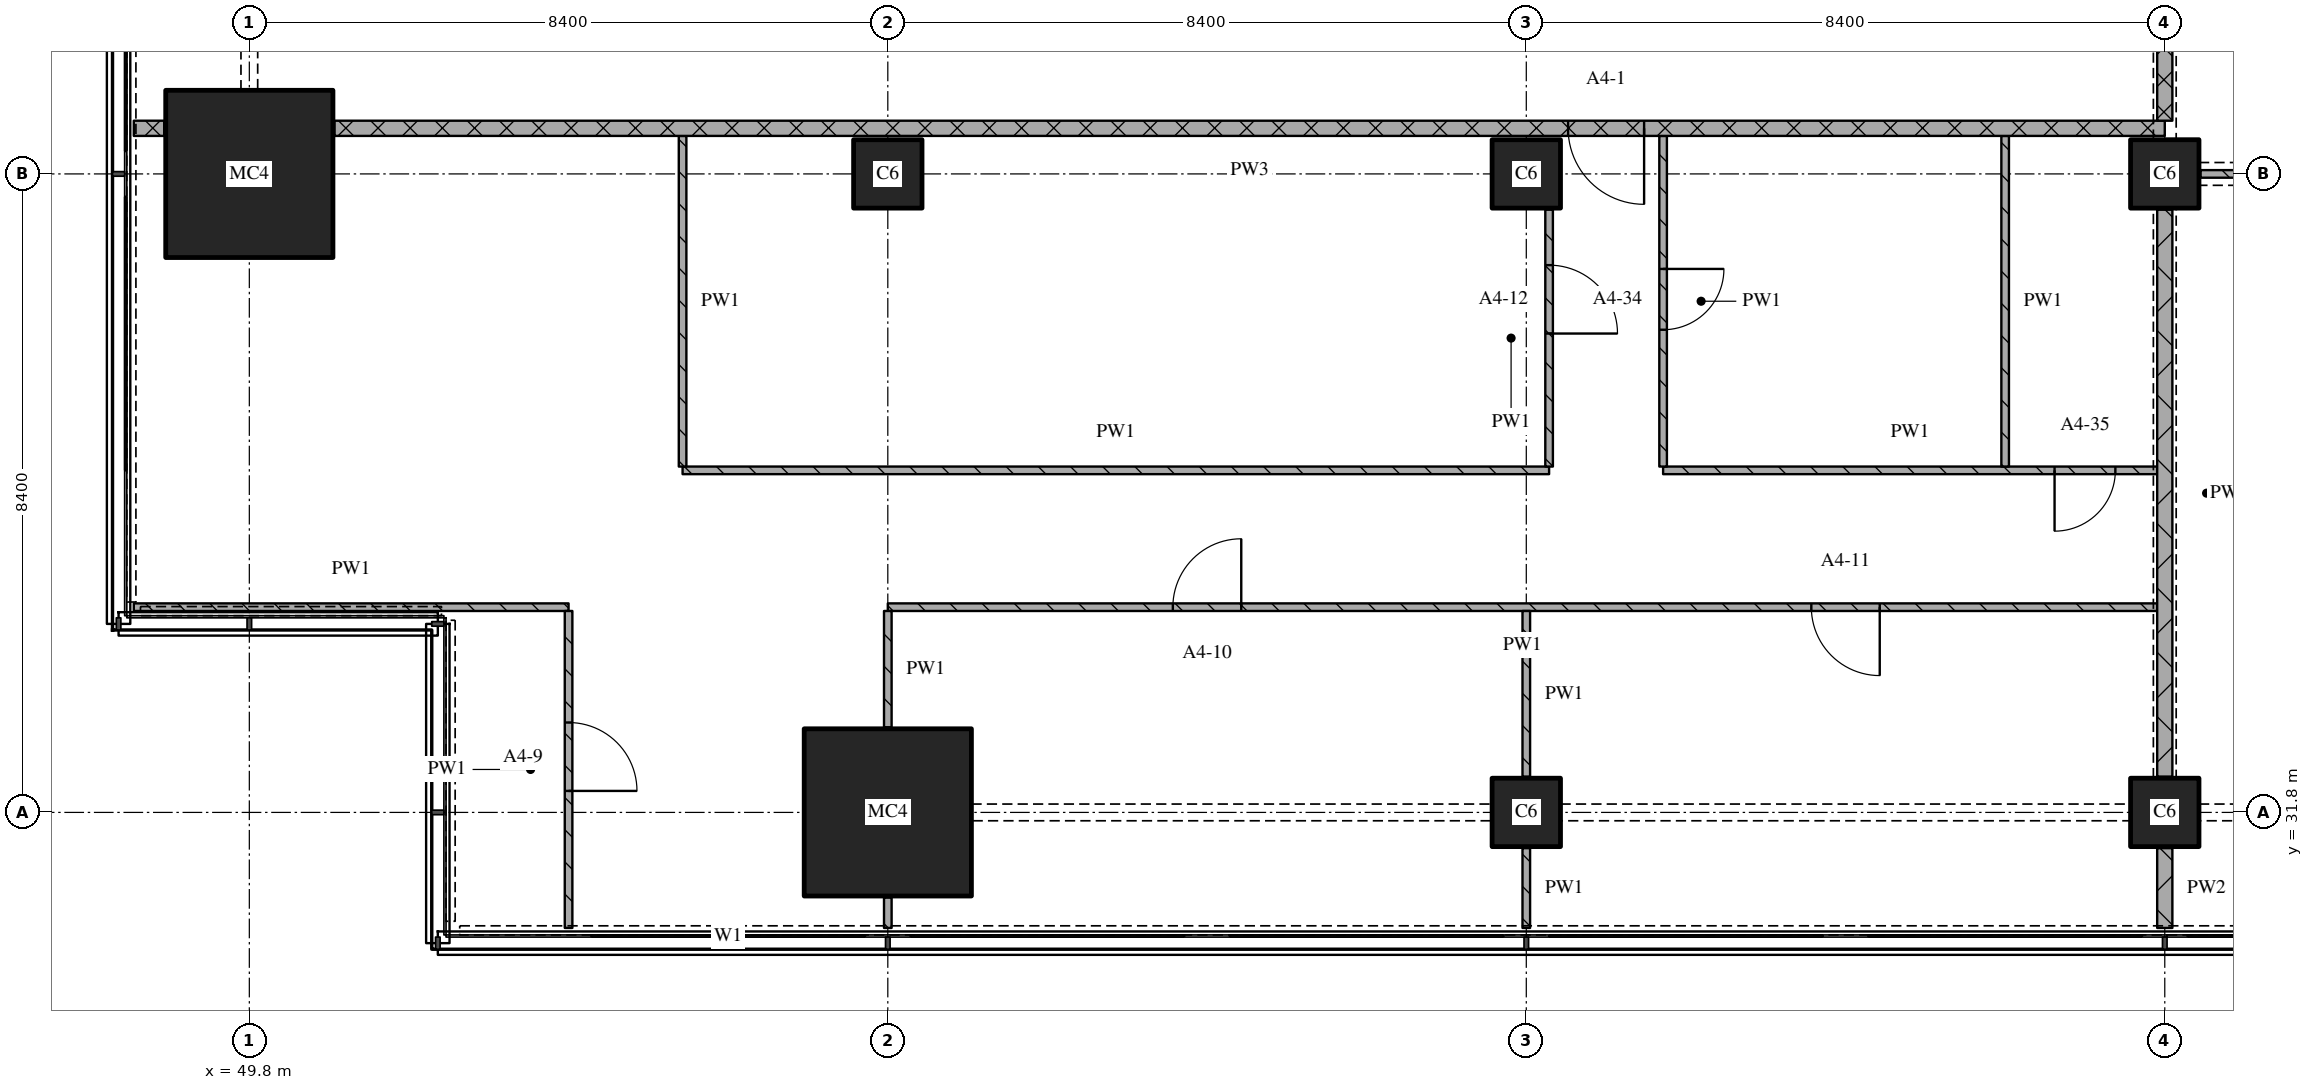
"""IFC4 building model, lengths in metres.
Left out: names, types, materials, properties, quantities, classifications, styles, units other than length and angle.
Written with IfcOpenShell. Run it as: python <this file> out.ifc"""

import sys

from ifc_helpers import new_model, si_unit, direction, frame, frame_2d, origin, origin_2d, place, context, subcontext, project, spatial, rectangle, extrude, element, fill, save


model = new_model("IFC4")
c1 = context("Model", 3, precision=1e-05, world=origin(), true_north=direction((0.0, 1.0)))
c2 = subcontext(c1, "Body", "Model", "MODEL_VIEW")
j1 = project(units=[si_unit("LENGTHUNIT", "METRE"), si_unit("PLANEANGLEUNIT", "RADIAN")], contexts=[c1])
p1 = place(None, origin())
s1 = spatial("IfcSite", under=j1, at=p1, CompositionType="ELEMENT")
p2 = place(p1, origin())
s2 = spatial("IfcBuilding", under=s1, at=p2, CompositionType="ELEMENT")
p3 = place(p2, frame((0.0, 0.0, 69.6)))
s3 = spatial("IfcBuildingStorey", under=s2, at=p3, CompositionType="ELEMENT", Elevation=69.6)
for number, where, z_axis, x_axis in (
    (1, (49.8, 40.2, 0.0), (0.0, 0.0, 1.0), (1.0, 0.0, 0.0)),
    (2, (58.2, 31.8, 0.0), (0.0, 0.0, 1.0), (1.0, 0.0, 0.0)),
):
    element("IfcColumn", number, at=place(p3, frame(where, z_axis=z_axis, x_axis=x_axis)), inside=s3, PredefinedType="COLUMN", context=c2, shape_type="SweptSolid", body=[
        extrude(rectangle(XDim=2.2, YDim=2.2, at=origin_2d()), origin(), (0.0, 0.0, 1.0), 3.6),
    ])
for number, where, z_axis, x_axis in (
    (3, (58.2, 40.2, 0.0), (0.0, 0.0, 1.0), (1.0, 0.0, 0.0)),
    (4, (66.6, 31.8, 0.0), (0.0, 0.0, 1.0), (1.0, 0.0, 0.0)),
    (5, (66.6, 40.2, 0.0), (0.0, 0.0, 1.0), (1.0, 0.0, 0.0)),
    (6, (75.0, 31.8, 0.0), (0.0, 0.0, 1.0), (1.0, 0.0, 0.0)),
    (7, (75.0, 40.2, 0.0), (0.0, 0.0, 1.0), (1.0, 0.0, 0.0)),
):
    element("IfcColumn", number, at=place(p3, frame(where, z_axis=z_axis, x_axis=x_axis)), inside=s3, PredefinedType="COLUMN", context=c2, shape_type="SweptSolid", body=[
        extrude(rectangle(XDim=0.9, YDim=0.9, at=origin_2d()), origin(), (0.0, 0.0, 1.0), 3.6),
    ])
p4 = place(p3, frame((48.28, 34.5, 0.0), z_axis=(0.0, 0.0, 1.0), x_axis=(1.0, 0.0, 0.0)))
e8 = element("IfcWall", 8, at=p4, inside=s3, PredefinedType="PARTITIONING", context=c2, shape_type="SweptSolid", body=[
    extrude(rectangle(XDim=5.72, YDim=0.1, at=frame_2d((2.86, 0.0))), origin(), (0.0, 0.0, 1.0), 3.32),
])
p5 = place(p3, frame((74.9, 34.5, 0.0), z_axis=(0.0, 0.0, 1.0), x_axis=(-1.0, 0.0, 0.0)))
e9 = element("IfcWall", 9, at=p5, inside=s3, PredefinedType="PARTITIONING", context=c2, shape_type="SweptSolid", body=[
    extrude(rectangle(XDim=16.7, YDim=0.1, at=frame_2d((8.35, 0.0))), origin(), (0.0, 0.0, 1.0), 3.32),
])
p6 = place(p5, frame((3.65, 0.0, 0.0)))
e10 = element("IfcOpeningElement", 10, at=p6, cuts=e9, PredefinedType="OPENING", context=c2, shape_type="SweptSolid", body=[
    extrude(rectangle(XDim=0.9, YDim=2.1, at=frame_2d((0.45, 1.05))), frame((0.0, 0.06, 0.0), z_axis=(0.0, -1.0, 0.0), x_axis=(1.0, 0.0, 0.0)), (0.0, 0.0, 1.0), 0.12),
])
p7 = place(p5, frame((12.05, 0.0, 0.0)))
e11 = element("IfcOpeningElement", 11, at=p7, cuts=e9, PredefinedType="OPENING", context=c2, shape_type="SweptSolid", body=[
    extrude(rectangle(XDim=0.9, YDim=2.1, at=frame_2d((0.45, 1.05))), frame((0.0, 0.06, 0.0), z_axis=(0.0, -1.0, 0.0), x_axis=(1.0, 0.0, 0.0)), (0.0, 0.0, 1.0), 0.12),
])
p8 = place(p3, frame((55.5, 36.3, 0.0), z_axis=(0.0, 0.0, 1.0), x_axis=(1.0, 0.0, 0.0)))
e12 = element("IfcWall", 12, at=p8, inside=s3, PredefinedType="PARTITIONING", context=c2, shape_type="SweptSolid", body=[
    extrude(rectangle(XDim=11.4, YDim=0.1, at=frame_2d((5.7, 0.0))), origin(), (0.0, 0.0, 1.0), 3.32),
])
p9 = place(p3, frame((68.4, 36.3, 0.0), z_axis=(0.0, 0.0, 1.0), x_axis=(1.0, 0.0, 0.0)))
e13 = element("IfcWall", 13, at=p9, inside=s3, PredefinedType="PARTITIONING", context=c2, shape_type="SweptSolid", body=[
    extrude(rectangle(XDim=6.5, YDim=0.1, at=frame_2d((3.25, 0.0))), origin(), (0.0, 0.0, 1.0), 3.32),
])
p10 = place(p9, frame((5.15, 0.0, 0.0)))
e14 = element("IfcOpeningElement", 14, at=p10, cuts=e13, PredefinedType="OPENING", context=c2, shape_type="SweptSolid", body=[
    extrude(rectangle(XDim=0.8, YDim=2.1, at=frame_2d((0.4, 1.05))), frame((0.0, 0.06, 0.0), z_axis=(0.0, -1.0, 0.0), x_axis=(1.0, 0.0, 0.0)), (0.0, 0.0, 1.0), 0.12),
])
p11 = place(p3, frame((75.47, 40.2, 0.0), z_axis=(0.0, 0.0, 1.0), x_axis=(1.0, 0.0, 0.0)))
e15 = element("IfcWall", 15, at=p11, inside=s3, PredefinedType="PARTITIONING", context=c2, shape_type="SweptSolid", body=[
    extrude(rectangle(XDim=2.23, YDim=0.1, at=frame_2d((1.115, 0.0))), origin(), (0.0, 0.0, 1.0), 2.83),
])
p12 = place(p11, frame((0.48, 0.0, 0.0)))
e16 = element("IfcOpeningElement", 16, at=p12, cuts=e15, PredefinedType="OPENING", context=c2, shape_type="SweptSolid", body=[
    extrude(rectangle(XDim=0.8, YDim=2.1, at=frame_2d((0.4, 1.05))), frame((0.0, 0.06, 0.0), z_axis=(0.0, -1.0, 0.0), x_axis=(1.0, 0.0, 0.0)), (0.0, 0.0, 1.0), 0.12),
])
p13 = place(p3, frame((48.28, 40.8, 0.0), z_axis=(0.0, 0.0, 1.0), x_axis=(1.0, 0.0, 0.0)))
e17 = element("IfcWall", 17, at=p13, inside=s3, PredefinedType="PARTITIONING", context=c2, shape_type="SweptSolid", body=[
    extrude(rectangle(XDim=0.4, YDim=0.2, at=frame_2d((0.2, 0.0))), origin(), (0.0, 0.0, 1.0), 3.32),
])
p14 = place(p3, frame((75.0, 40.8, 0.0), z_axis=(0.0, 0.0, 1.0), x_axis=(-1.0, 0.0, 0.0)))
e18 = element("IfcWall", 18, at=p14, inside=s3, PredefinedType="PARTITIONING", context=c2, shape_type="SweptSolid", body=[
    extrude(rectangle(XDim=24.08, YDim=0.2, at=frame_2d((12.04, 0.0))), origin(), (0.0, 0.0, 1.0), 3.32),
])
p15 = place(p14, frame((6.85, 0.0, 0.0)))
e19 = element("IfcOpeningElement", 19, at=p15, cuts=e18, PredefinedType="OPENING", context=c2, shape_type="SweptSolid", body=[
    extrude(rectangle(XDim=1.0, YDim=2.1, at=frame_2d((0.5, 1.05))), frame((0.0, 0.11, 0.0), z_axis=(0.0, -1.0, 0.0), x_axis=(1.0, 0.0, 0.0)), (0.0, 0.0, 1.0), 0.22),
])
p16 = place(p3, frame((54.0, 30.28, 0.0), z_axis=(0.0, 0.0, 1.0), x_axis=(0.0, 1.0, 0.0)))
e20 = element("IfcWall", 20, at=p16, inside=s3, PredefinedType="PARTITIONING", context=c2, shape_type="SweptSolid", body=[
    extrude(rectangle(XDim=4.17, YDim=0.1, at=frame_2d((2.085, 0.0))), origin(), (0.0, 0.0, 1.0), 3.32),
])
p17 = place(p16, frame((1.803, 0.0, 0.0)))
e21 = element("IfcOpeningElement", 21, at=p17, cuts=e20, PredefinedType="OPENING", context=c2, shape_type="SweptSolid", body=[
    extrude(rectangle(XDim=0.9, YDim=2.1, at=frame_2d((0.45, 1.05))), frame((0.0, 0.06, 0.0), z_axis=(0.0, -1.0, 0.0), x_axis=(1.0, 0.0, 0.0)), (0.0, 0.0, 1.0), 0.12),
])
p18 = place(p3, frame((55.5, 40.7, 0.0), z_axis=(0.0, 0.0, 1.0), x_axis=(0.0, -1.0, 0.0)))
e22 = element("IfcWall", 22, at=p18, inside=s3, PredefinedType="PARTITIONING", context=c2, shape_type="SweptSolid", body=[
    extrude(rectangle(XDim=4.35, YDim=0.1, at=frame_2d((2.175, 0.0))), origin(), (0.0, 0.0, 1.0), 3.32),
])
p19 = place(p3, frame((58.2, 30.68, 0.0), z_axis=(0.0, 0.0, 1.0), x_axis=(0.0, -1.0, 0.0)))
e23 = element("IfcWall", 23, at=p19, inside=s3, PredefinedType="PARTITIONING", context=c2, shape_type="SweptSolid", body=[
    extrude(rectangle(XDim=0.4, YDim=0.1, at=frame_2d((0.2, 0.0))), origin(), (0.0, 0.0, 1.0), 3.32),
])
p20 = place(p3, frame((58.2, 34.45, 0.0), z_axis=(0.0, 0.0, 1.0), x_axis=(0.0, -1.0, 0.0)))
e24 = element("IfcWall", 24, at=p20, inside=s3, PredefinedType="PARTITIONING", context=c2, shape_type="SweptSolid", body=[
    extrude(rectangle(XDim=1.53, YDim=0.1, at=frame_2d((0.765, 0.0))), origin(), (0.0, 0.0, 1.0), 3.32),
])
p21 = place(p3, frame((66.6, 31.33, 0.0), z_axis=(0.0, 0.0, 1.0), x_axis=(0.0, -1.0, 0.0)))
e25 = element("IfcWall", 25, at=p21, inside=s3, PredefinedType="PARTITIONING", context=c2, shape_type="SweptSolid", body=[
    extrude(rectangle(XDim=1.05, YDim=0.1, at=frame_2d((0.525, 0.0))), origin(), (0.0, 0.0, 1.0), 3.32),
])
p22 = place(p3, frame((66.6, 34.45, 0.0), z_axis=(0.0, 0.0, 1.0), x_axis=(0.0, -1.0, 0.0)))
e26 = element("IfcWall", 26, at=p22, inside=s3, PredefinedType="PARTITIONING", context=c2, shape_type="SweptSolid", body=[
    extrude(rectangle(XDim=2.18, YDim=0.1, at=frame_2d((1.09, 0.0))), origin(), (0.0, 0.0, 1.0), 3.32),
])
p23 = place(p3, frame((66.9, 36.35, 0.0), z_axis=(0.0, 0.0, 1.0), x_axis=(0.0, 1.0, 0.0)))
e27 = element("IfcWall", 27, at=p23, inside=s3, PredefinedType="PARTITIONING", context=c2, shape_type="SweptSolid", body=[
    extrude(rectangle(XDim=3.38, YDim=0.1, at=frame_2d((1.69, 0.0))), origin(), (0.0, 0.0, 1.0), 3.32),
])
p24 = place(p23, frame((1.75, 0.0, 0.0)))
e28 = element("IfcOpeningElement", 28, at=p24, cuts=e27, PredefinedType="OPENING", context=c2, shape_type="SweptSolid", body=[
    extrude(rectangle(XDim=0.9, YDim=2.1, at=frame_2d((0.45, 1.05))), frame((0.0, 0.06, 0.0), z_axis=(0.0, -1.0, 0.0), x_axis=(1.0, 0.0, 0.0)), (0.0, 0.0, 1.0), 0.12),
])
p25 = place(p3, frame((68.4, 40.7, 0.0), z_axis=(0.0, 0.0, 1.0), x_axis=(0.0, -1.0, 0.0)))
e29 = element("IfcWall", 29, at=p25, inside=s3, PredefinedType="PARTITIONING", context=c2, shape_type="SweptSolid", body=[
    extrude(rectangle(XDim=4.35, YDim=0.1, at=frame_2d((2.175, 0.0))), origin(), (0.0, 0.0, 1.0), 3.32),
])
p26 = place(p25, frame((1.75, 0.0, 0.0)))
e30 = element("IfcOpeningElement", 30, at=p26, cuts=e29, PredefinedType="OPENING", context=c2, shape_type="SweptSolid", body=[
    extrude(rectangle(XDim=0.8, YDim=2.1, at=frame_2d((0.4, 1.05))), frame((0.0, 0.06, 0.0), z_axis=(0.0, -1.0, 0.0), x_axis=(1.0, 0.0, 0.0)), (0.0, 0.0, 1.0), 0.12),
])
p27 = place(p3, frame((72.9, 40.7, 0.0), z_axis=(0.0, 0.0, 1.0), x_axis=(0.0, -1.0, 0.0)))
e31 = element("IfcWall", 31, at=p27, inside=s3, PredefinedType="PARTITIONING", context=c2, shape_type="SweptSolid", body=[
    extrude(rectangle(XDim=4.35, YDim=0.1, at=frame_2d((2.175, 0.0))), origin(), (0.0, 0.0, 1.0), 3.32),
])
p28 = place(p3, frame((75.0, 43.1, 0.0), z_axis=(0.0, 0.0, 1.0), x_axis=(0.0, -1.0, 0.0)))
e32 = element("IfcWall", 32, at=p28, inside=s3, PredefinedType="PARTITIONING", context=c2, shape_type="SweptSolid", body=[
    extrude(rectangle(XDim=2.2, YDim=0.2, at=frame_2d((1.1, 0.0))), origin(), (0.0, 0.0, 1.0), 2.43),
])
p29 = place(p3, frame((75.0, 31.33, 0.0), z_axis=(0.0, 0.0, 1.0), x_axis=(0.0, -1.0, 0.0)))
e33 = element("IfcWall", 33, at=p29, inside=s3, PredefinedType="PARTITIONING", context=c2, shape_type="SweptSolid", body=[
    extrude(rectangle(XDim=1.05, YDim=0.2, at=frame_2d((0.525, 0.0))), origin(), (0.0, 0.0, 1.0), 3.32),
])
p30 = place(p3, frame((75.0, 39.73, 0.0), z_axis=(0.0, 0.0, 1.0), x_axis=(0.0, -1.0, 0.0)))
e34 = element("IfcWall", 34, at=p30, inside=s3, PredefinedType="PARTITIONING", context=c2, shape_type="SweptSolid", body=[
    extrude(rectangle(XDim=7.46, YDim=0.2, at=frame_2d((3.73, 0.0))), origin(), (0.0, 0.0, 1.0), 2.83),
])
p31 = place(p6, origin())
e35 = element("IfcDoor", 35, at=p31, inside=s3, OperationType="SINGLE_SWING_LEFT", PredefinedType="DOOR", context=c2, shape_type="SweptSolid", body=[
    extrude(rectangle(XDim=0.9, YDim=2.1, at=frame_2d((0.45, 1.05))), frame((0.0, 0.025, 0.0), z_axis=(0.0, -1.0, 0.0), x_axis=(1.0, 0.0, 0.0)), (0.0, 0.0, 1.0), 0.05),
])
fill(e10, e35)
p32 = place(p7, origin())
e36 = element("IfcDoor", 36, at=p32, inside=s3, OperationType="SINGLE_SWING_RIGHT", PredefinedType="DOOR", context=c2, shape_type="SweptSolid", body=[
    extrude(rectangle(XDim=0.9, YDim=2.1, at=frame_2d((0.45, 1.05))), frame((0.0, 0.025, 0.0), z_axis=(0.0, -1.0, 0.0), x_axis=(1.0, 0.0, 0.0)), (0.0, 0.0, 1.0), 0.05),
])
fill(e11, e36)
p33 = place(p10, origin())
e37 = element("IfcDoor", 37, at=p33, inside=s3, OperationType="SINGLE_SWING_RIGHT", PredefinedType="DOOR", context=c2, shape_type="SweptSolid", body=[
    extrude(rectangle(XDim=0.8, YDim=2.1, at=frame_2d((0.4, 1.05))), frame((0.0, 0.025, 0.0), z_axis=(0.0, -1.0, 0.0), x_axis=(1.0, 0.0, 0.0)), (0.0, 0.0, 1.0), 0.05),
])
fill(e14, e37)
p34 = place(p15, origin())
e38 = element("IfcDoor", 38, at=p34, inside=s3, OperationType="SINGLE_SWING_LEFT", PredefinedType="DOOR", context=c2, shape_type="SweptSolid", body=[
    extrude(rectangle(XDim=1.0, YDim=2.1, at=frame_2d((0.5, 1.05))), frame((0.0, 0.025, 0.0), z_axis=(0.0, -1.0, 0.0), x_axis=(1.0, 0.0, 0.0)), (0.0, 0.0, 1.0), 0.05),
])
fill(e19, e38)
p35 = place(p17, origin())
e39 = element("IfcDoor", 39, at=p35, inside=s3, OperationType="SINGLE_SWING_RIGHT", PredefinedType="DOOR", context=c2, shape_type="SweptSolid", body=[
    extrude(rectangle(XDim=0.9, YDim=2.1, at=frame_2d((0.45, 1.05))), frame((0.0, 0.025, 0.0), z_axis=(0.0, -1.0, 0.0), x_axis=(1.0, 0.0, 0.0)), (0.0, 0.0, 1.0), 0.05),
])
fill(e21, e39)
p36 = place(p24, origin())
e40 = element("IfcDoor", 40, at=p36, inside=s3, OperationType="SINGLE_SWING_RIGHT", PredefinedType="DOOR", context=c2, shape_type="SweptSolid", body=[
    extrude(rectangle(XDim=0.9, YDim=2.1, at=frame_2d((0.45, 1.05))), frame((0.0, 0.025, 0.0), z_axis=(0.0, -1.0, 0.0), x_axis=(1.0, 0.0, 0.0)), (0.0, 0.0, 1.0), 0.05),
])
fill(e28, e40)
p37 = place(p26, origin())
e41 = element("IfcDoor", 41, at=p37, inside=s3, OperationType="SINGLE_SWING_LEFT", PredefinedType="DOOR", context=c2, shape_type="SweptSolid", body=[
    extrude(rectangle(XDim=0.8, YDim=2.1, at=frame_2d((0.4, 1.05))), frame((0.0, 0.025, 0.0), z_axis=(0.0, -1.0, 0.0), x_axis=(1.0, 0.0, 0.0)), (0.0, 0.0, 1.0), 0.05),
])
fill(e30, e41)
save(model, sys.argv[1])
